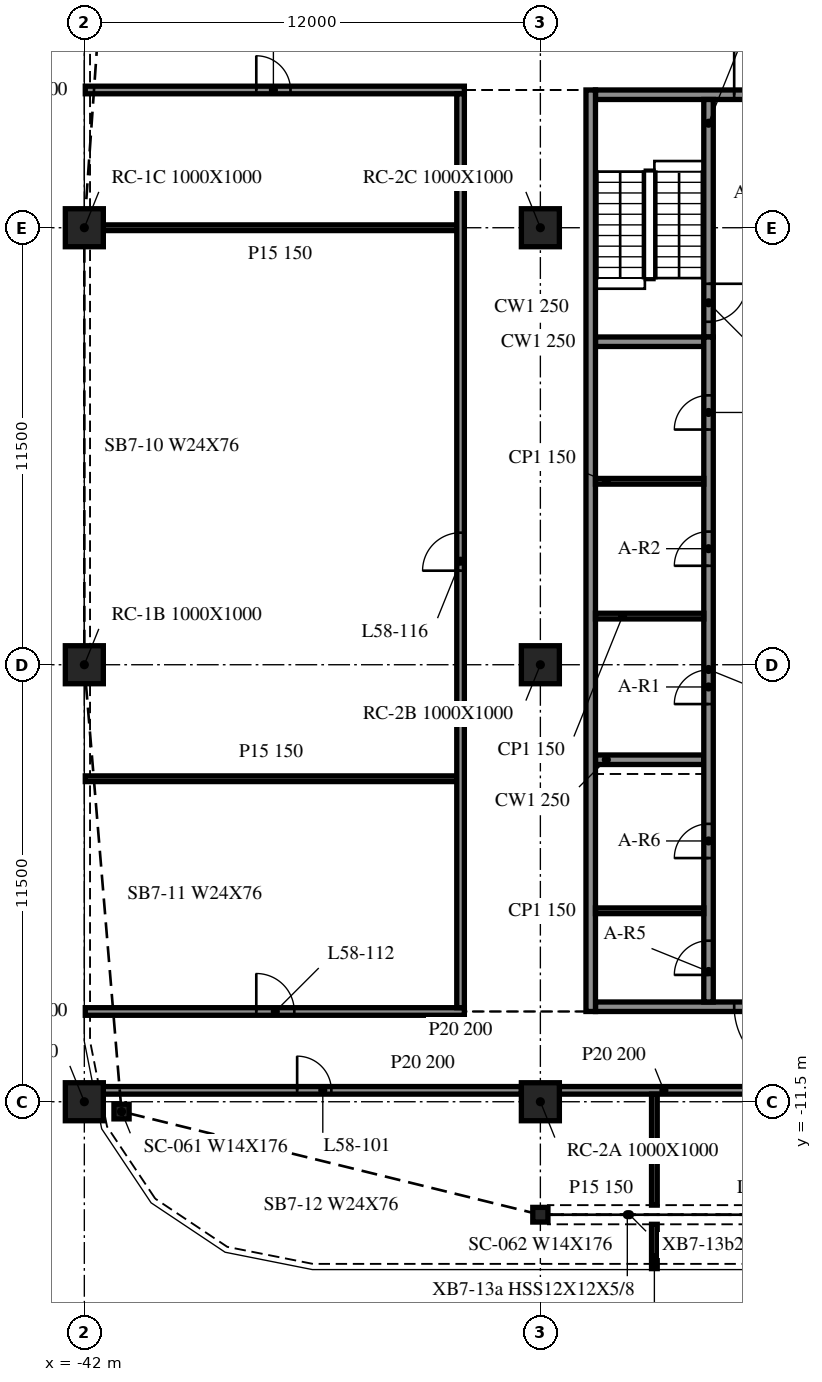
"""IFC4 building model, lengths in metres.
Left out: names, types, materials, properties, quantities, classifications, styles, units other than length and angle.
Written with IfcOpenShell. Run it as: python <this file> out.ifc"""

import sys

from ifc_helpers import new_model, si_unit, direction, frame, frame_2d, origin, origin_2d, place, context, subcontext, project, spatial, rectangle, i_section, extrude, element, fill, save


model = new_model("IFC4")
c1 = context("Model", 3, precision=1e-05, world=origin(), true_north=direction((0.0, 1.0)))
c2 = subcontext(c1, "Body", "Model", "MODEL_VIEW")
j1 = project(units=[si_unit("LENGTHUNIT", "METRE"), si_unit("PLANEANGLEUNIT", "RADIAN")], contexts=[c1])
p1 = place(None, origin())
s1 = spatial("IfcSite", under=j1, at=p1, CompositionType="ELEMENT")
p2 = place(p1, origin())
s2 = spatial("IfcBuilding", under=s1, at=p2, CompositionType="ELEMENT")
p3 = place(p2, frame((0.0, 0.0, 240.0)))
s3 = spatial("IfcBuildingStorey", under=s2, at=p3, CompositionType="ELEMENT", Elevation=240.0)
for number, where, z_axis, x_axis in (
    (1, (-42.0, -11.5, -0.34), (0.0, 0.0, 1.0), (1.0, 0.0, 0.0)),
    (2, (-42.0, 0.0, -0.34), (0.0, 0.0, 1.0), (1.0, 0.0, 0.0)),
    (3, (-42.0, 11.5, -0.34), (0.0, 0.0, 1.0), (1.0, 0.0, 0.0)),
    (4, (-30.0, -11.5, -0.34), (0.0, 0.0, 1.0), (1.0, 0.0, 0.0)),
    (5, (-30.0, 0.0, -0.34), (0.0, 0.0, 1.0), (1.0, 0.0, 0.0)),
    (6, (-30.0, 11.5, -0.34), (0.0, 0.0, 1.0), (1.0, 0.0, 0.0)),
):
    element("IfcColumn", number, at=place(p3, frame(where, z_axis=z_axis, x_axis=x_axis)), inside=s3, PredefinedType="COLUMN", context=c2, shape_type="SweptSolid", body=[
        extrude(rectangle(XDim=1.0, YDim=1.0, at=origin_2d()), origin(), (0.0, 0.0, 1.0), 3.8),
    ])
for number, where, z_axis, x_axis in (
    (7, (-41.021, -11.758, -0.34), (0.0, 0.0, 1.0), (1.0, 0.0, 0.0)),
    (8, (-30.0, -14.473, -0.34), (0.0, 0.0, 1.0), (1.0, 0.0, 0.0)),
):
    element("IfcColumn", number, at=place(p3, frame(where, z_axis=z_axis, x_axis=x_axis)), inside=s3, PredefinedType="COLUMN", context=c2, shape_type="SweptSolid", body=[
        extrude(i_section(OverallWidth=0.399, OverallDepth=0.386, WebThickness=0.021, FlangeThickness=0.033, at=origin_2d()), origin(), (0.0, 0.0, 1.0), 3.8),
    ])
p4 = place(p3, frame((-28.675, 15.125, 0.0), z_axis=(0.0, 0.0, 1.0), x_axis=(0.0, -1.0, 0.0)))
e9 = element("IfcWall", 9, at=p4, inside=s3, PredefinedType="SOLIDWALL", context=c2, shape_type="SweptSolid", body=[
    extrude(rectangle(XDim=24.25, YDim=0.25, at=frame_2d((12.125, 0.0))), origin(), (0.0, 0.0, 1.0), 3.46),
])
p5 = place(p3, frame((-19.45, -9.0, 0.0), z_axis=(0.0, 0.0, 1.0), x_axis=(-1.0, 0.0, 0.0)))
e10 = element("IfcWall", 10, at=p5, inside=s3, PredefinedType="SOLIDWALL", context=c2, shape_type="SweptSolid", body=[
    extrude(rectangle(XDim=9.1, YDim=0.25, at=frame_2d((4.55, 0.0))), origin(), (0.0, 0.0, 1.0), 3.46),
])
p6 = place(p5, frame((3.65, 0.0, 0.0)))
e11 = element("IfcOpeningElement", 11, at=p6, cuts=e10, PredefinedType="OPENING", context=c2, shape_type="SweptSolid", body=[
    extrude(rectangle(XDim=1.8, YDim=2.1, at=frame_2d((0.9, 1.05))), frame((0.0, 0.135, 0.0), z_axis=(0.0, -1.0, 0.0), x_axis=(1.0, 0.0, 0.0)), (0.0, 0.0, 1.0), 0.27),
])
p7 = place(p3, frame((-28.55, 15.0, 0.0), z_axis=(0.0, 0.0, 1.0), x_axis=(1.0, 0.0, 0.0)))
e12 = element("IfcWall", 12, at=p7, inside=s3, PredefinedType="SOLIDWALL", context=c2, shape_type="SweptSolid", body=[
    extrude(rectangle(XDim=9.1, YDim=0.25, at=frame_2d((4.55, 0.0))), origin(), (0.0, 0.0, 1.0), 3.46),
])
p8 = place(p7, frame((3.65, 0.0, 0.0)))
e13 = element("IfcOpeningElement", 13, at=p8, cuts=e12, PredefinedType="OPENING", context=c2, shape_type="SweptSolid", body=[
    extrude(rectangle(XDim=1.8, YDim=2.1, at=frame_2d((0.9, 1.05))), frame((0.0, 0.135, 0.0), z_axis=(0.0, -1.0, 0.0), x_axis=(1.0, 0.0, 0.0)), (0.0, 0.0, 1.0), 0.27),
])
p9 = place(p3, frame((-25.575, -8.875, 0.0), z_axis=(0.0, 0.0, 1.0), x_axis=(0.0, 1.0, 0.0)))
e14 = element("IfcWall", 14, at=p9, inside=s3, PredefinedType="SOLIDWALL", context=c2, shape_type="SweptSolid", body=[
    extrude(rectangle(XDim=17.5, YDim=0.25, at=frame_2d((8.75, 0.0))), origin(), (0.0, 0.0, 1.0), 3.46),
])
p10 = place(p9, frame((7.84, 0.0, 0.0)))
e15 = element("IfcOpeningElement", 15, at=p10, cuts=e14, PredefinedType="OPENING", context=c2, shape_type="SweptSolid", body=[
    extrude(rectangle(XDim=0.9, YDim=2.1, at=frame_2d((0.45, 1.05))), frame((0.0, 0.135, 0.0), z_axis=(0.0, -1.0, 0.0), x_axis=(1.0, 0.0, 0.0)), (0.0, 0.0, 1.0), 0.27),
])
p11 = place(p9, frame((11.479, 0.0, 0.0)))
e16 = element("IfcOpeningElement", 16, at=p11, cuts=e14, PredefinedType="OPENING", context=c2, shape_type="SweptSolid", body=[
    extrude(rectangle(XDim=0.9, YDim=2.1, at=frame_2d((0.45, 1.05))), frame((0.0, 0.135, 0.0), z_axis=(0.0, -1.0, 0.0), x_axis=(1.0, 0.0, 0.0)), (0.0, 0.0, 1.0), 0.27),
])
p12 = place(p9, frame((15.064, 0.0, 0.0)))
e17 = element("IfcOpeningElement", 17, at=p12, cuts=e14, PredefinedType="OPENING", context=c2, shape_type="SweptSolid", body=[
    extrude(rectangle(XDim=0.9, YDim=2.1, at=frame_2d((0.45, 1.05))), frame((0.0, 0.135, 0.0), z_axis=(0.0, -1.0, 0.0), x_axis=(1.0, 0.0, 0.0)), (0.0, 0.0, 1.0), 0.27),
])
p13 = place(p9, frame((0.712, 0.0, 0.0)))
e18 = element("IfcOpeningElement", 18, at=p13, cuts=e14, PredefinedType="OPENING", context=c2, shape_type="SweptSolid", body=[
    extrude(rectangle(XDim=0.9, YDim=2.1, at=frame_2d((0.45, 1.05))), frame((0.0, 0.135, 0.0), z_axis=(0.0, -1.0, 0.0), x_axis=(1.0, 0.0, 0.0)), (0.0, 0.0, 1.0), 0.27),
])
p14 = place(p9, frame((3.788, 0.0, 0.0)))
e19 = element("IfcOpeningElement", 19, at=p14, cuts=e14, PredefinedType="OPENING", context=c2, shape_type="SweptSolid", body=[
    extrude(rectangle(XDim=0.9, YDim=2.1, at=frame_2d((0.45, 1.05))), frame((0.0, 0.135, 0.0), z_axis=(0.0, -1.0, 0.0), x_axis=(1.0, 0.0, 0.0)), (0.0, 0.0, 1.0), 0.27),
])
p15 = place(p3, frame((-25.575, 14.875, 0.0), z_axis=(0.0, 0.0, 1.0), x_axis=(0.0, -1.0, 0.0)))
e20 = element("IfcWall", 20, at=p15, inside=s3, PredefinedType="SOLIDWALL", context=c2, shape_type="SweptSolid", body=[
    extrude(rectangle(XDim=6.25, YDim=0.25, at=frame_2d((3.125, 0.0))), origin(), (0.0, 0.0, 1.0), 3.46),
])
p16 = place(p15, frame((4.85, 0.0, 0.0)))
e21 = element("IfcOpeningElement", 21, at=p16, cuts=e20, PredefinedType="OPENING", context=c2, shape_type="SweptSolid", body=[
    extrude(rectangle(XDim=1.0, YDim=2.1, at=frame_2d((0.5, 1.05))), frame((0.0, 0.135, 0.0), z_axis=(0.0, -1.0, 0.0), x_axis=(1.0, 0.0, 0.0)), (0.0, 0.0, 1.0), 0.27),
])
for number, where, z_axis, x_axis in (
    (22, (-28.55, -2.5, 0.0), (0.0, 0.0, 1.0), (1.0, 0.0, 0.0)),
    (23, (-28.55, 8.5, 0.0), (0.0, 0.0, 1.0), (1.0, 0.0, 0.0)),
):
    element("IfcWall", number, at=place(p3, frame(where, z_axis=z_axis, x_axis=x_axis)), inside=s3, PredefinedType="SOLIDWALL", context=c2, shape_type="SweptSolid", body=[
        extrude(rectangle(XDim=2.85, YDim=0.25, at=frame_2d((1.425, 0.0))), origin(), (0.0, 0.0, 1.0), 3.46),
    ])
for number, where, z_axis, x_axis in (
    (24, (-28.55, 1.28, 0.0), (0.0, 0.0, 1.0), (1.0, 0.0, 0.0)),
    (25, (-28.55, 4.827, 0.0), (0.0, 0.0, 1.0), (1.0, 0.0, 0.0)),
    (26, (-28.55, -6.475, 0.0), (0.0, 0.0, 1.0), (1.0, 0.0, 0.0)),
):
    element("IfcWall", number, at=place(p3, frame(where, z_axis=z_axis, x_axis=x_axis)), inside=s3, PredefinedType="PARTITIONING", context=c2, shape_type="SweptSolid", body=[
        extrude(rectangle(XDim=2.85, YDim=0.15, at=frame_2d((1.425, 0.0))), origin(), (0.0, 0.0, 1.0), 3.46),
    ])
p17 = place(p3, frame((-41.5, -11.2, 0.0), z_axis=(0.0, 0.0, 1.0), x_axis=(1.0, 0.0, 0.0)))
e27 = element("IfcWall", 27, at=p17, inside=s3, PredefinedType="PARTITIONING", context=c2, shape_type="SweptSolid", body=[
    extrude(rectangle(XDim=11.0, YDim=0.2, at=frame_2d((5.5, 0.0))), origin(), (0.0, 0.0, 1.0), 3.46),
])
p18 = place(p17, frame((5.1, 0.0, 0.0)))
e28 = element("IfcOpeningElement", 28, at=p18, cuts=e27, PredefinedType="OPENING", context=c2, shape_type="SweptSolid", body=[
    extrude(rectangle(XDim=0.9, YDim=2.1, at=frame_2d((0.45, 1.05))), frame((0.0, 0.11, 0.0), z_axis=(0.0, -1.0, 0.0), x_axis=(1.0, 0.0, 0.0)), (0.0, 0.0, 1.0), 0.22),
])
p19 = place(p3, frame((-29.5, -11.2, 0.0), z_axis=(0.0, 0.0, 1.0), x_axis=(1.0, 0.0, 0.0)))
e29 = element("IfcWall", 29, at=p19, inside=s3, PredefinedType="PARTITIONING", context=c2, shape_type="SweptSolid", body=[
    extrude(rectangle(XDim=11.0, YDim=0.2, at=frame_2d((5.5, 0.0))), origin(), (0.0, 0.0, 1.0), 3.46),
])
p20 = place(p19, frame((5.1, 0.0, 0.0)))
e30 = element("IfcOpeningElement", 30, at=p20, cuts=e29, PredefinedType="OPENING", context=c2, shape_type="SweptSolid", body=[
    extrude(rectangle(XDim=0.9, YDim=2.1, at=frame_2d((0.45, 1.05))), frame((0.0, 0.11, 0.0), z_axis=(0.0, -1.0, 0.0), x_axis=(1.0, 0.0, 0.0)), (0.0, 0.0, 1.0), 0.22),
])
p21 = place(p19, frame((8.9, 0.0, 0.0)))
e31 = element("IfcOpeningElement", 31, at=p21, cuts=e29, PredefinedType="OPENING", context=c2, shape_type="SweptSolid", body=[
    extrude(rectangle(XDim=0.9, YDim=2.1, at=frame_2d((0.45, 1.05))), frame((0.0, 0.11, 0.0), z_axis=(0.0, -1.0, 0.0), x_axis=(1.0, 0.0, 0.0)), (0.0, 0.0, 1.0), 0.22),
])
p22 = place(p3, frame((-41.975, -9.125, 0.0), z_axis=(0.0, 0.0, 1.0), x_axis=(1.0, 0.0, 0.0)))
e32 = element("IfcWall", 32, at=p22, inside=s3, PredefinedType="PARTITIONING", context=c2, shape_type="SweptSolid", body=[
    extrude(rectangle(XDim=9.975, YDim=0.2, at=frame_2d((4.988, 0.0))), origin(), (0.0, 0.0, 1.0), 3.46),
])
p23 = place(p22, frame((4.5, 0.0, 0.0)))
e33 = element("IfcOpeningElement", 33, at=p23, cuts=e32, PredefinedType="OPENING", context=c2, shape_type="SweptSolid", body=[
    extrude(rectangle(XDim=1.0, YDim=2.1, at=frame_2d((0.5, 1.05))), frame((0.0, 0.11, 0.0), z_axis=(0.0, -1.0, 0.0), x_axis=(1.0, 0.0, 0.0)), (0.0, 0.0, 1.0), 0.22),
])
p24 = place(p3, frame((-41.975, -3.0, 0.0), z_axis=(0.0, 0.0, 1.0), x_axis=(1.0, 0.0, 0.0)))
e34 = element("IfcWall", 34, at=p24, inside=s3, PredefinedType="PARTITIONING", context=c2, shape_type="SweptSolid", body=[
    extrude(rectangle(XDim=9.775, YDim=0.15, at=frame_2d((4.888, 0.0))), origin(), (0.0, 0.0, 1.0), 3.46),
])
p25 = place(p3, frame((-41.5, 11.5, 0.0), z_axis=(0.0, 0.0, 1.0), x_axis=(1.0, 0.0, 0.0)))
e35 = element("IfcWall", 35, at=p25, inside=s3, PredefinedType="PARTITIONING", context=c2, shape_type="SweptSolid", body=[
    extrude(rectangle(XDim=9.3, YDim=0.15, at=frame_2d((4.65, 0.0))), origin(), (0.0, 0.0, 1.0), 3.46),
])
p26 = place(p3, frame((-41.975, 15.125, 0.0), z_axis=(0.0, 0.0, 1.0), x_axis=(1.0, 0.0, 0.0)))
e36 = element("IfcWall", 36, at=p26, inside=s3, PredefinedType="PARTITIONING", context=c2, shape_type="SweptSolid", body=[
    extrude(rectangle(XDim=9.975, YDim=0.2, at=frame_2d((4.988, 0.0))), origin(), (0.0, 0.0, 1.0), 3.46),
])
p27 = place(p26, frame((4.5, 0.0, 0.0)))
e37 = element("IfcOpeningElement", 37, at=p27, cuts=e36, PredefinedType="OPENING", context=c2, shape_type="SweptSolid", body=[
    extrude(rectangle(XDim=0.9, YDim=2.1, at=frame_2d((0.45, 1.05))), frame((0.0, 0.11, 0.0), z_axis=(0.0, -1.0, 0.0), x_axis=(1.0, 0.0, 0.0)), (0.0, 0.0, 1.0), 0.22),
])
p28 = place(p3, frame((-32.1, -9.025, 0.0), z_axis=(0.0, 0.0, 1.0), x_axis=(0.0, 1.0, 0.0)))
e38 = element("IfcWall", 38, at=p28, inside=s3, PredefinedType="PARTITIONING", context=c2, shape_type="SweptSolid", body=[
    extrude(rectangle(XDim=24.05, YDim=0.2, at=frame_2d((12.025, 0.0))), origin(), (0.0, 0.0, 1.0), 3.46),
])
p29 = place(p28, frame((11.5, 0.0, 0.0)))
e39 = element("IfcOpeningElement", 39, at=p29, cuts=e38, PredefinedType="OPENING", context=c2, shape_type="SweptSolid", body=[
    extrude(rectangle(XDim=1.0, YDim=2.1, at=frame_2d((0.5, 1.05))), frame((0.0, 0.11, 0.0), z_axis=(0.0, -1.0, 0.0), x_axis=(1.0, 0.0, 0.0)), (0.0, 0.0, 1.0), 0.22),
])
p30 = place(p3, frame((-27.0, -15.892, 0.0), z_axis=(0.0, 0.0, 1.0), x_axis=(0.0, 1.0, 0.0)))
e40 = element("IfcWall", 40, at=p30, inside=s3, PredefinedType="PARTITIONING", context=c2, shape_type="SweptSolid", body=[
    extrude(rectangle(XDim=1.167, YDim=0.15, at=frame_2d((0.583, 0.0))), origin(), (0.0, 0.0, 1.0), 3.46),
])
p31 = place(p3, frame((-27.0, -14.221, 0.0), z_axis=(0.0, 0.0, 1.0), x_axis=(0.0, 1.0, 0.0)))
e41 = element("IfcWall", 41, at=p31, inside=s3, PredefinedType="PARTITIONING", context=c2, shape_type="SweptSolid", body=[
    extrude(rectangle(XDim=2.921, YDim=0.15, at=frame_2d((1.46, 0.0))), origin(), (0.0, 0.0, 1.0), 3.46),
])
p32 = place(p6, origin())
e42 = element("IfcDoor", 42, at=p32, inside=s3, OperationType="DOUBLE_DOOR_SINGLE_SWING", PredefinedType="DOOR", context=c2, shape_type="SweptSolid", body=[
    extrude(rectangle(XDim=1.8, YDim=2.1, at=frame_2d((0.9, 1.05))), frame((0.0, 0.025, 0.0), z_axis=(0.0, -1.0, 0.0), x_axis=(1.0, 0.0, 0.0)), (0.0, 0.0, 1.0), 0.05),
])
fill(e11, e42)
p33 = place(p8, origin())
e43 = element("IfcDoor", 43, at=p33, inside=s3, OperationType="DOUBLE_DOOR_SINGLE_SWING", PredefinedType="DOOR", context=c2, shape_type="SweptSolid", body=[
    extrude(rectangle(XDim=1.8, YDim=2.1, at=frame_2d((0.9, 1.05))), frame((0.0, 0.025, 0.0), z_axis=(0.0, -1.0, 0.0), x_axis=(1.0, 0.0, 0.0)), (0.0, 0.0, 1.0), 0.05),
])
fill(e13, e43)
p34 = place(p10, origin())
e44 = element("IfcDoor", 44, at=p34, inside=s3, OperationType="SINGLE_SWING_LEFT", PredefinedType="DOOR", context=c2, shape_type="SweptSolid", body=[
    extrude(rectangle(XDim=0.9, YDim=2.1, at=frame_2d((0.45, 1.05))), frame((0.0, 0.025, 0.0), z_axis=(0.0, -1.0, 0.0), x_axis=(1.0, 0.0, 0.0)), (0.0, 0.0, 1.0), 0.05),
])
fill(e15, e44)
p35 = place(p11, origin())
e45 = element("IfcDoor", 45, at=p35, inside=s3, OperationType="SINGLE_SWING_RIGHT", PredefinedType="DOOR", context=c2, shape_type="SweptSolid", body=[
    extrude(rectangle(XDim=0.9, YDim=2.1, at=frame_2d((0.45, 1.05))), frame((0.0, 0.025, 0.0), z_axis=(0.0, -1.0, 0.0), x_axis=(1.0, 0.0, 0.0)), (0.0, 0.0, 1.0), 0.05),
])
fill(e16, e45)
p36 = place(p12, origin())
e46 = element("IfcDoor", 46, at=p36, inside=s3, OperationType="SINGLE_SWING_LEFT", PredefinedType="DOOR", context=c2, shape_type="SweptSolid", body=[
    extrude(rectangle(XDim=0.9, YDim=2.1, at=frame_2d((0.45, 1.05))), frame((0.0, 0.025, 0.0), z_axis=(0.0, -1.0, 0.0), x_axis=(1.0, 0.0, 0.0)), (0.0, 0.0, 1.0), 0.05),
])
fill(e17, e46)
p37 = place(p13, origin())
e47 = element("IfcDoor", 47, at=p37, inside=s3, OperationType="SINGLE_SWING_LEFT", PredefinedType="DOOR", context=c2, shape_type="SweptSolid", body=[
    extrude(rectangle(XDim=0.9, YDim=2.1, at=frame_2d((0.45, 1.05))), frame((0.0, 0.025, 0.0), z_axis=(0.0, -1.0, 0.0), x_axis=(1.0, 0.0, 0.0)), (0.0, 0.0, 1.0), 0.05),
])
fill(e18, e47)
p38 = place(p14, origin())
e48 = element("IfcDoor", 48, at=p38, inside=s3, OperationType="SINGLE_SWING_RIGHT", PredefinedType="DOOR", context=c2, shape_type="SweptSolid", body=[
    extrude(rectangle(XDim=0.9, YDim=2.1, at=frame_2d((0.45, 1.05))), frame((0.0, 0.025, 0.0), z_axis=(0.0, -1.0, 0.0), x_axis=(1.0, 0.0, 0.0)), (0.0, 0.0, 1.0), 0.05),
])
fill(e19, e48)
p39 = place(p16, origin())
e49 = element("IfcDoor", 49, at=p39, inside=s3, OperationType="SINGLE_SWING_LEFT", PredefinedType="DOOR", context=c2, shape_type="SweptSolid", body=[
    extrude(rectangle(XDim=1.0, YDim=2.1, at=frame_2d((0.5, 1.05))), frame((0.0, 0.025, 0.0), z_axis=(0.0, -1.0, 0.0), x_axis=(1.0, 0.0, 0.0)), (0.0, 0.0, 1.0), 0.05),
])
fill(e21, e49)
p40 = place(p18, origin())
e50 = element("IfcDoor", 50, at=p40, inside=s3, OperationType="SINGLE_SWING_LEFT", PredefinedType="DOOR", context=c2, shape_type="SweptSolid", body=[
    extrude(rectangle(XDim=0.9, YDim=2.1, at=frame_2d((0.45, 1.05))), frame((0.0, 0.025, 0.0), z_axis=(0.0, -1.0, 0.0), x_axis=(1.0, 0.0, 0.0)), (0.0, 0.0, 1.0), 0.05),
])
fill(e28, e50)
p41 = place(p23, origin())
e51 = element("IfcDoor", 51, at=p41, inside=s3, OperationType="SINGLE_SWING_RIGHT", PredefinedType="DOOR", context=c2, shape_type="SweptSolid", body=[
    extrude(rectangle(XDim=1.0, YDim=2.1, at=frame_2d((0.5, 1.05))), frame((0.0, 0.025, 0.0), z_axis=(0.0, -1.0, 0.0), x_axis=(1.0, 0.0, 0.0)), (0.0, 0.0, 1.0), 0.05),
])
fill(e33, e51)
p42 = place(p29, origin())
e52 = element("IfcDoor", 52, at=p42, inside=s3, OperationType="SINGLE_SWING_LEFT", PredefinedType="DOOR", context=c2, shape_type="SweptSolid", body=[
    extrude(rectangle(XDim=1.0, YDim=2.1, at=frame_2d((0.5, 1.05))), frame((0.0, 0.025, 0.0), z_axis=(0.0, -1.0, 0.0), x_axis=(1.0, 0.0, 0.0)), (0.0, 0.0, 1.0), 0.05),
])
fill(e39, e52)
p43 = place(p27, origin())
e53 = element("IfcDoor", 53, at=p43, inside=s3, OperationType="SINGLE_SWING_LEFT", PredefinedType="DOOR", context=c2, shape_type="SweptSolid", body=[
    extrude(rectangle(XDim=0.9, YDim=2.1, at=frame_2d((0.45, 1.05))), frame((0.0, 0.025, 0.0), z_axis=(0.0, -1.0, 0.0), x_axis=(1.0, 0.0, 0.0)), (0.0, 0.0, 1.0), 0.05),
])
fill(e37, e53)
save(model, sys.argv[1])
